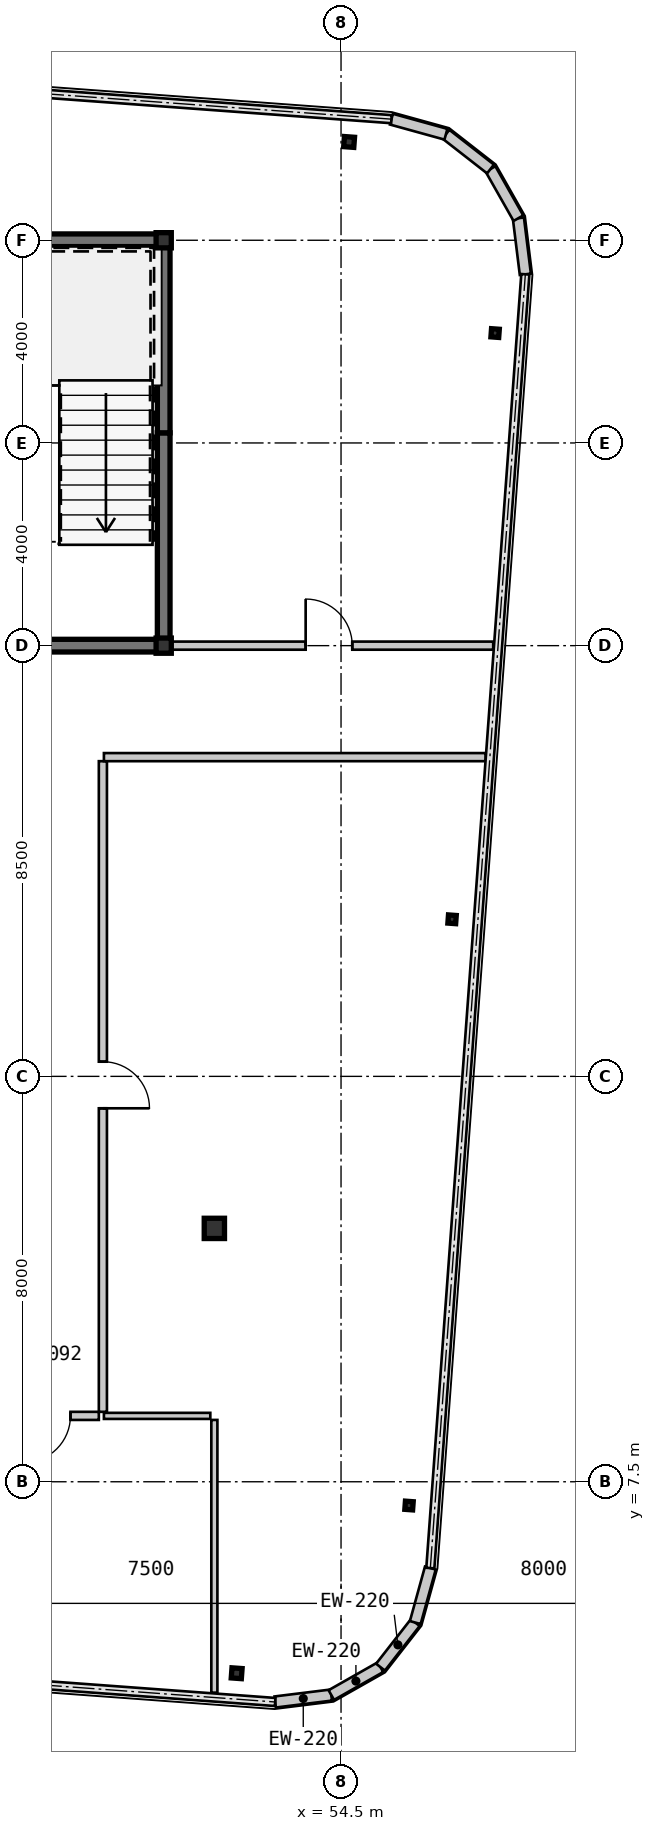
"""IFC4 building model, lengths in metres.
Left out: names, types, materials, properties, quantities, classifications, styles, units other than length and angle.
Written with IfcOpenShell. Run it as: python <this file> out.ifc"""

import sys

from ifc_helpers import new_model, si_unit, direction, frame, frame_2d, origin, origin_2d, place, context, subcontext, project, spatial, rectangle, hollow_rectangle, i_section, extrude, source, transform, mapped, element, fill, save


model = new_model("IFC4")
c1 = context("Model", 3, precision=1e-05, world=origin(), true_north=direction((0.0, 1.0)))
c2 = subcontext(c1, "Body", "Model", "MODEL_VIEW")
j1 = project(units=[si_unit("LENGTHUNIT", "METRE"), si_unit("PLANEANGLEUNIT", "RADIAN")], contexts=[c1])
p1 = place(None, origin())
s1 = spatial("IfcSite", under=j1, at=p1, CompositionType="ELEMENT")
p2 = place(p1, origin())
s2 = spatial("IfcBuilding", under=s1, at=p2, CompositionType="ELEMENT")
p3 = place(p2, frame((0.0, 0.0, 246.05)))
s3 = spatial("IfcBuildingStorey", under=s2, at=p3, CompositionType="ELEMENT", Elevation=246.05)
m1 = source(origin(), c2, "Body", "SweptSolid", [
    extrude(hollow_rectangle(XDim=0.3, YDim=0.3, WallThickness=0.012, at=origin_2d()), origin(), (0.0, 0.0, 1.0), 3.15),
])
for number, where, z_axis, x_axis in (
    (1, (51.0, 24.0, 0.0), (0.0, 0.0, 1.0), (1.0, 0.0, 0.0)),
    (2, (51.0, 32.0, 0.0), (0.0, 0.0, 1.0), (1.0, 0.0, 0.0)),
):
    element("IfcColumn", number, at=place(p3, frame(where, z_axis=z_axis, x_axis=x_axis)), inside=s3, PredefinedType="COLUMN", context=c2, shape_type="MappedRepresentation", body=[
        mapped(m1, transform((0.0, 0.0, 0.0), scale=1.0)),
    ])
m2 = source(origin(), c2, "Body", "SweptSolid", [
    extrude(hollow_rectangle(XDim=0.4, YDim=0.4, WallThickness=0.016, at=origin_2d()), origin(), (0.0, 0.0, 1.0), 3.15),
])
p4 = place(p3, frame((52.0, 12.5, 0.0), z_axis=(0.0, 0.0, 1.0), x_axis=(1.0, 0.0, 0.0)))
e3 = element("IfcColumn", 3, at=p4, inside=s3, PredefinedType="COLUMN", context=c2, shape_type="MappedRepresentation", body=[
    mapped(m2, transform((0.0, 0.0, 0.0), scale=1.0)),
])
m3 = source(origin(), c2, "Body", "SweptSolid", [
    extrude(hollow_rectangle(XDim=0.2, YDim=0.2, WallThickness=0.009, at=origin_2d()), origin(), (0.0, 0.0, 1.0), 3.15),
])
for number, where, z_axis, x_axis in (
    (4, (52.44, 3.721, 0.0), (0.0, 0.0, 1.0), (0.997, -0.073, 0.0)),
    (5, (54.659, 33.94, 0.0), (0.0, 0.0, 1.0), (0.997, -0.073, 0.0)),
):
    element("IfcColumn", number, at=place(p3, frame(where, z_axis=z_axis, x_axis=x_axis)), inside=s3, PredefinedType="COLUMN", context=c2, shape_type="MappedRepresentation", body=[
        mapped(m3, transform((0.0, 0.0, 0.0), scale=1.0)),
    ])
m4 = source(origin(), c2, "Body", "SweptSolid", [
    extrude(i_section(OverallWidth=0.154, OverallDepth=0.162, WebThickness=0.008, FlangeThickness=0.011, at=origin_2d()), origin(), (0.0, 0.0, 1.0), 3.15),
])
for number, where, z_axis, x_axis in (
    (6, (55.842, 7.031, 0.0), (0.0, 0.0, 1.0), (0.997, -0.073, 0.0)),
    (7, (56.691, 18.6, 0.0), (0.0, 0.0, 1.0), (0.997, -0.073, 0.0)),
    (8, (57.541, 30.169, 0.0), (0.0, 0.0, 1.0), (0.997, -0.073, 0.0)),
):
    element("IfcColumn", number, at=place(p3, frame(where, z_axis=z_axis, x_axis=x_axis)), inside=s3, PredefinedType="COLUMN", context=c2, shape_type="MappedRepresentation", body=[
        mapped(m4, transform((0.0, 0.0, 0.0), scale=1.0)),
    ])
m5 = source(origin(), c2, "Body", "SweptSolid", [
    extrude(rectangle(XDim=1.116, YDim=0.22, at=frame_2d((0.558, 0.0))), origin(), (0.0, 0.0, 1.0), 2.93),
])
p5 = place(p3, frame((53.201, 3.154, 0.0), z_axis=(0.0, 0.0, 1.0), x_axis=(0.992438604032, 0.122742076028, 0.0)))
e9 = element("IfcWall", 9, at=p5, inside=s3, PredefinedType="SOLIDWALL", context=c2, shape_type="MappedRepresentation", body=[
    mapped(m5, transform((0.0, 0.0, 0.0), scale=1.0)),
])
m6 = source(origin(), c2, "Body", "SweptSolid", [
    extrude(rectangle(XDim=1.116, YDim=0.22, at=frame_2d((0.558, 0.0))), origin(), (0.0, 0.0, 1.0), 2.93),
])
p6 = place(p3, frame((54.308, 3.291, 0.0), z_axis=(0.0, 0.0, 1.0), x_axis=(0.869893934693, 0.49323882895, 0.0)))
e10 = element("IfcWall", 10, at=p6, inside=s3, PredefinedType="SOLIDWALL", context=c2, shape_type="MappedRepresentation", body=[
    mapped(m6, transform((0.0, 0.0, 0.0), scale=1.0)),
])
for number, where, z_axis, x_axis in (
    (11, (55.279, 3.841, 0.0), (0.0, 0.0, 1.0), (0.615, 0.789, 0.0)),
    (12, (55.965, 4.721, 0.0), (0.0, 0.0, 1.0), (0.266, 0.964, 0.0)),
    (13, (58.137, 31.328, 0.0), (0.0, 0.0, 1.0), (-0.123, 0.992, 0.0)),
):
    element("IfcWall", number, at=place(p3, frame(where, z_axis=z_axis, x_axis=x_axis)), inside=s3, PredefinedType="SOLIDWALL", context=c2, shape_type="MappedRepresentation", body=[
        mapped(m5, transform((0.0, 0.0, 0.0), scale=1.0)),
    ])
m7 = source(origin(), c2, "Body", "SweptSolid", [
    extrude(rectangle(XDim=1.116, YDim=0.22, at=frame_2d((0.558, 0.0))), origin(), (0.0, 0.0, 1.0), 2.93),
])
p7 = place(p3, frame((58.0, 32.436, 0.0), z_axis=(0.0, 0.0, 1.0), x_axis=(-0.493167138628, 0.869934579941, 0.0)))
e14 = element("IfcWall", 14, at=p7, inside=s3, PredefinedType="SOLIDWALL", context=c2, shape_type="MappedRepresentation", body=[
    mapped(m7, transform((0.0, 0.0, 0.0), scale=1.0)),
])
p8 = place(p3, frame((57.45, 33.406, 0.0), z_axis=(0.0, 0.0, 1.0), x_axis=(-0.788597772321, 0.614909386406, 0.0)))
e15 = element("IfcWall", 15, at=p8, inside=s3, PredefinedType="SOLIDWALL", context=c2, shape_type="MappedRepresentation", body=[
    mapped(m5, transform((0.0, 0.0, 0.0), scale=1.0)),
])
p9 = place(p3, frame((56.57, 34.093, 0.0), z_axis=(0.0, 0.0, 1.0), x_axis=(-0.963833843713, 0.266503886865, 0.0)))
e16 = element("IfcWall", 16, at=p9, inside=s3, PredefinedType="SOLIDWALL", context=c2, shape_type="MappedRepresentation", body=[
    mapped(m7, transform((0.0, 0.0, 0.0), scale=1.0)),
])
m8 = source(origin(), c2, "Body", "SweptSolid", [
    extrude(rectangle(XDim=11.925, YDim=0.25, at=frame_2d((5.962, 0.0))), origin(), (0.0, 0.0, 1.0), 2.93),
])
p10 = place(p3, frame((39.2, 32.0, 0.0), z_axis=(0.0, 0.0, 1.0), x_axis=(1.0, 0.0, 0.0)))
e17 = element("IfcWall", 17, at=p10, inside=s3, PredefinedType="SHEAR", context=c2, shape_type="MappedRepresentation", body=[
    mapped(m8, transform((0.0, 0.0, 0.0), scale=1.0)),
])
m9 = source(origin(), c2, "Body", "SweptSolid", [
    extrude(rectangle(XDim=4.075, YDim=0.25, at=frame_2d((2.038, 0.0))), origin(), (0.0, 0.0, 1.0), 2.93),
])
p11 = place(p3, frame((51.0, 24.125, 0.0), z_axis=(0.0, 0.0, 1.0), x_axis=(0.0, 1.0, 0.0)))
e18 = element("IfcWall", 18, at=p11, inside=s3, PredefinedType="SHEAR", context=c2, shape_type="MappedRepresentation", body=[
    mapped(m9, transform((0.0, 0.0, 0.0), scale=1.0)),
])
m10 = source(origin(), c2, "Body", "SweptSolid", [
    extrude(rectangle(XDim=3.675, YDim=0.25, at=frame_2d((1.837, 0.0))), origin(), (0.0, 0.0, 1.0), 2.93),
])
p12 = place(p3, frame((51.0, 28.2, 0.0), z_axis=(0.0, 0.0, 1.0), x_axis=(0.0, 1.0, 0.0)))
e19 = element("IfcWall", 19, at=p12, inside=s3, PredefinedType="SHEAR", context=c2, shape_type="MappedRepresentation", body=[
    mapped(m10, transform((0.0, 0.0, 0.0), scale=1.0)),
])
m11 = source(origin(), c2, "Body", "SweptSolid", [
    extrude(rectangle(XDim=4.85, YDim=0.25, at=frame_2d((2.425, 0.0))), origin(), (0.0, 0.0, 1.0), 2.93),
])
p13 = place(p3, frame((46.275, 24.0, 0.0), z_axis=(0.0, 0.0, 1.0), x_axis=(1.0, 0.0, 0.0)))
e20 = element("IfcWall", 20, at=p13, inside=s3, PredefinedType="SHEAR", context=c2, shape_type="MappedRepresentation", body=[
    mapped(m11, transform((0.0, 0.0, 0.0), scale=1.0)),
])
m12 = source(origin(), c2, "Body", "SweptSolid", [
    extrude(rectangle(XDim=2.04, YDim=0.16, at=frame_2d((1.02, 0.0))), origin(), (0.0, 0.0, 1.0), 2.93),
])
p14 = place(p3, frame((49.72, 8.8, 0.0), z_axis=(0.0, 0.0, 1.0), x_axis=(-1.0, 0.0, 0.0)))
e21 = element("IfcWall", 21, at=p14, inside=s3, PredefinedType="PARTITIONING", context=c2, shape_type="MappedRepresentation", body=[
    mapped(m12, transform((0.0, 0.0, 0.0), scale=1.0)),
])
m13 = source(origin(), c2, "Body", "SweptSolid", [
    extrude(rectangle(XDim=0.92, YDim=2.1, at=frame_2d((0.46, 1.05))), frame((0.0, 0.09, 0.0), z_axis=(0.0, -1.0, 0.0), x_axis=(1.0, 0.0, 0.0)), (0.0, 0.0, 1.0), 0.18),
])
p15 = place(p14, frame((0.56, 0.0, 0.0)))
e22 = element("IfcOpeningElement", 22, at=p15, cuts=e21, PredefinedType="OPENING", context=c2, shape_type="MappedRepresentation", body=[
    mapped(m13, transform((0.0, 0.0, 0.0), scale=1.0)),
])
m14 = source(origin(), c2, "Body", "SweptSolid", [
    extrude(rectangle(XDim=6.378, YDim=0.16, at=frame_2d((3.189, 0.0))), origin(), (0.0, 0.0, 1.0), 2.93),
])
p16 = place(p3, frame((51.125, 24.0, 0.0), z_axis=(0.0, 0.0, 1.0), x_axis=(1.0, 0.0, 0.0)))
e23 = element("IfcWall", 23, at=p16, inside=s3, PredefinedType="PARTITIONING", context=c2, shape_type="MappedRepresentation", body=[
    mapped(m14, transform((0.0, 0.0, 0.0), scale=1.0)),
])
p17 = place(p16, frame((2.677, 0.0, 0.0)))
e24 = element("IfcOpeningElement", 24, at=p17, cuts=e23, PredefinedType="OPENING", context=c2, shape_type="MappedRepresentation", body=[
    mapped(m13, transform((0.0, 0.0, 0.0), scale=1.0)),
])
m15 = source(origin(), c2, "Body", "SweptSolid", [
    extrude(rectangle(XDim=12.84, YDim=0.16, at=frame_2d((6.42, 0.0))), origin(), (0.0, 0.0, 1.0), 2.93),
])
p18 = place(p3, frame((49.8, 21.72, 0.0), z_axis=(0.0, 0.0, 1.0), x_axis=(0.0, -1.0, 0.0)))
e25 = element("IfcWall", 25, at=p18, inside=s3, PredefinedType="PARTITIONING", context=c2, shape_type="MappedRepresentation", body=[
    mapped(m15, transform((0.0, 0.0, 0.0), scale=1.0)),
])
p19 = place(p18, frame((5.93, 0.0, 0.0)))
e26 = element("IfcOpeningElement", 26, at=p19, cuts=e25, PredefinedType="OPENING", context=c2, shape_type="MappedRepresentation", body=[
    mapped(m13, transform((0.0, 0.0, 0.0), scale=1.0)),
])
m16 = source(origin(), c2, "Body", "SweptSolid", [
    extrude(rectangle(XDim=7.533, YDim=0.16, at=frame_2d((3.767, 0.0))), origin(), (0.0, 0.0, 1.0), 2.93),
])
p20 = place(p3, frame((57.353, 21.8, 0.0), z_axis=(0.0, 0.0, 1.0), x_axis=(-1.0, 0.0, 0.0)))
e27 = element("IfcWall", 27, at=p20, inside=s3, PredefinedType="PARTITIONING", context=c2, shape_type="MappedRepresentation", body=[
    mapped(m16, transform((0.0, 0.0, 0.0), scale=1.0)),
])
m17 = source(origin(), c2, "Body", "SweptSolid", [
    extrude(rectangle(XDim=5.382, YDim=0.12, at=frame_2d((2.691, 0.0))), origin(), (0.0, 0.0, 1.0), 2.93),
])
p21 = place(p3, frame((52.0, 8.72, 0.0), z_axis=(0.0, 0.0, 1.0), x_axis=(0.0, -1.0, 0.0)))
e28 = element("IfcWall", 28, at=p21, inside=s3, PredefinedType="PARTITIONING", context=c2, shape_type="MappedRepresentation", body=[
    mapped(m17, transform((0.0, 0.0, 0.0), scale=1.0)),
])
m18 = source(origin(), c2, "Body", "SweptSolid", [
    extrude(rectangle(XDim=2.1, YDim=0.12, at=frame_2d((1.05, 0.0))), origin(), (0.0, 0.0, 1.0), 2.93),
])
p22 = place(p3, frame((49.82, 8.8, 0.0), z_axis=(0.0, 0.0, 1.0), x_axis=(1.0, 0.0, 0.0)))
e29 = element("IfcWall", 29, at=p22, inside=s3, PredefinedType="PARTITIONING", context=c2, shape_type="MappedRepresentation", body=[
    mapped(m18, transform((0.0, 0.0, 0.0), scale=1.0)),
])
m19 = source(origin(), c2, "Body", "SweptSolid", [
    extrude(rectangle(XDim=0.92, YDim=2.1, at=frame_2d((0.46, 1.05))), frame((0.0, 0.025, 0.0), z_axis=(0.0, -1.0, 0.0), x_axis=(1.0, 0.0, 0.0)), (0.0, 0.0, 1.0), 0.05),
])
p23 = place(p15, origin())
e30 = element("IfcDoor", 30, at=p23, inside=s3, OperationType="SINGLE_SWING_RIGHT", PredefinedType="DOOR", context=c2, shape_type="MappedRepresentation", body=[
    mapped(m19, transform((0.0, 0.0, 0.0), scale=1.0)),
])
fill(e22, e30)
p24 = place(p17, origin())
e31 = element("IfcDoor", 31, at=p24, inside=s3, OperationType="SINGLE_SWING_LEFT", PredefinedType="DOOR", context=c2, shape_type="MappedRepresentation", body=[
    mapped(m19, transform((0.0, 0.0, 0.0), scale=1.0)),
])
fill(e24, e31)
p25 = place(p19, origin())
e32 = element("IfcDoor", 32, at=p25, inside=s3, OperationType="SINGLE_SWING_RIGHT", PredefinedType="DOOR", context=c2, shape_type="MappedRepresentation", body=[
    mapped(m19, transform((0.0, 0.0, 0.0), scale=1.0)),
])
fill(e26, e32)
save(model, sys.argv[1])
